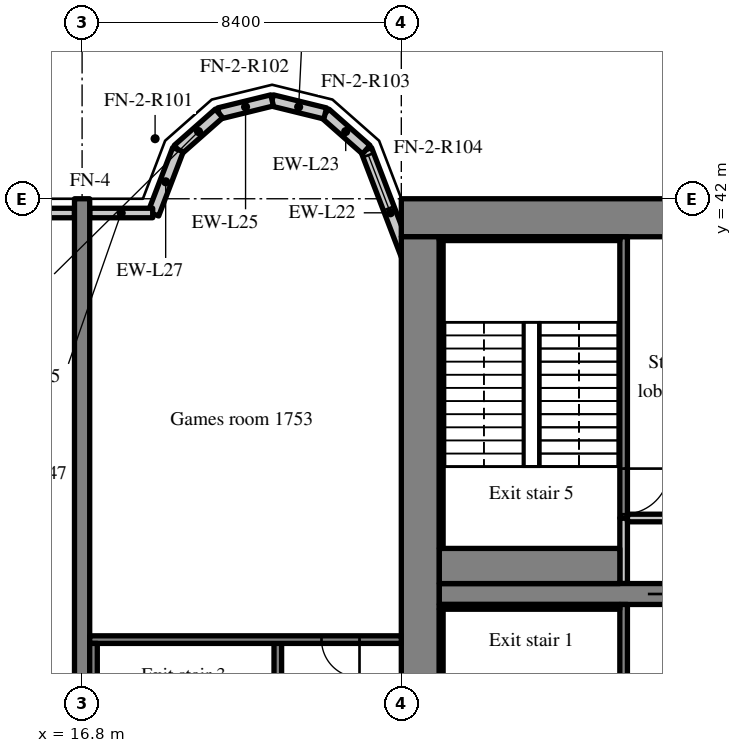
"""IFC4 building model, lengths in metres.
Left out: names, types, materials, properties, quantities, classifications, styles, units other than length and angle.
Written with IfcOpenShell. Run it as: python <this file> out.ifc"""

import sys

from ifc_helpers import new_model, si_unit, direction, frame, frame_2d, origin, place, context, subcontext, project, spatial, rectangle, extrude, source, transform, mapped, element, fill, save


model = new_model("IFC4")
c1 = context("Model", 3, precision=1e-05, world=origin(), true_north=direction((0.0, 1.0)))
c2 = subcontext(c1, "Body", "Model", "MODEL_VIEW")
j1 = project(units=[si_unit("LENGTHUNIT", "METRE"), si_unit("PLANEANGLEUNIT", "RADIAN")], contexts=[c1])
p1 = place(None, origin())
s1 = spatial("IfcSite", under=j1, at=p1, CompositionType="ELEMENT")
p2 = place(p1, origin())
s2 = spatial("IfcBuilding", under=s1, at=p2, CompositionType="ELEMENT")
p3 = place(p2, frame((0.0, 0.0, 73.4)))
s3 = spatial("IfcBuildingStorey", under=s2, at=p3, CompositionType="ELEMENT", Elevation=73.4)
m1 = source(origin(), c2, "Body", "SweptSolid", [
    extrude(rectangle(XDim=50.4, YDim=1.0, at=frame_2d((25.2, 0.0))), origin(), (0.0, 0.0, 1.0), 3.52),
])
p4 = place(p3, frame((25.2, 41.5, 0.0), z_axis=(0.0, 0.0, 1.0), x_axis=(1.0, 0.0, 0.0)))
e1 = element("IfcWall", 1, at=p4, inside=s3, PredefinedType="SHEAR", context=c2, shape_type="MappedRepresentation", body=[
    mapped(m1, transform((0.0, 0.0, 0.0), scale=1.0)),
])
m2 = source(origin(), c2, "Body", "SweptSolid", [
    extrude(rectangle(XDim=18.0, YDim=1.0, at=frame_2d((9.0, 0.0))), origin(), (0.0, 0.0, 1.0), 3.52),
])
p5 = place(p3, frame((25.7, 23.0, 0.0), z_axis=(0.0, 0.0, 1.0), x_axis=(0.0, 1.0, 0.0)))
e2 = element("IfcWall", 2, at=p5, inside=s3, PredefinedType="SHEAR", context=c2, shape_type="MappedRepresentation", body=[
    mapped(m2, transform((0.0, 0.0, 0.0), scale=1.0)),
])
m3 = source(origin(), c2, "Body", "SweptSolid", [
    extrude(rectangle(XDim=7.125, YDim=0.55, at=frame_2d((3.562, 0.0))), origin(), (0.0, 0.0, 1.0), 3.52),
])
p6 = place(p3, frame((26.2, 31.6, 0.0), z_axis=(0.0, 0.0, 1.0), x_axis=(1.0, 0.0, 0.0)))
e3 = element("IfcWall", 3, at=p6, inside=s3, PredefinedType="SHEAR", context=c2, shape_type="MappedRepresentation", body=[
    mapped(m3, transform((0.0, 0.0, 0.0), scale=1.0)),
])
m4 = source(origin(), c2, "Body", "SweptSolid", [
    extrude(rectangle(XDim=1.1, YDim=2.1, at=frame_2d((0.55, 1.05))), frame((0.0, 0.285, 0.0), z_axis=(0.0, -1.0, 0.0), x_axis=(1.0, 0.0, 0.0)), (0.0, 0.0, 1.0), 0.57),
])
p7 = place(p6, frame((5.488, 0.0, 0.0)))
e4 = element("IfcOpeningElement", 4, at=p7, cuts=e3, PredefinedType="OPENING", context=c2, shape_type="MappedRepresentation", body=[
    mapped(m4, transform((0.0, 0.0, 0.0), scale=1.0)),
])
m5 = source(origin(), c2, "Body", "SweptSolid", [
    extrude(rectangle(XDim=20.0, YDim=0.4, at=frame_2d((10.0, 0.0))), origin(), (0.0, 0.0, 1.0), 3.52),
])
p8 = place(p3, frame((16.8, 22.0, 0.0), z_axis=(0.0, 0.0, 1.0), x_axis=(0.0, 1.0, 0.0)))
e5 = element("IfcWall", 5, at=p8, inside=s3, PredefinedType="SHEAR", context=c2, shape_type="MappedRepresentation", body=[
    mapped(m5, transform((0.0, 0.0, 0.0), scale=1.0)),
])
m6 = source(origin(), c2, "Body", "SweptSolid", [
    extrude(rectangle(XDim=3.559, YDim=0.3, at=frame_2d((1.78, 0.0))), origin(), (0.0, 0.0, 1.0), 3.52),
])
p9 = place(p3, frame((25.55, 39.969, 0.0), z_axis=(0.0, 0.0, 1.0), x_axis=(-0.35779745313, 0.933799219604, 0.0)))
e6 = element("IfcWall", 6, at=p9, inside=s3, PredefinedType="SOLIDWALL", context=c2, shape_type="MappedRepresentation", body=[
    mapped(m6, transform((0.0, 0.0, 0.0), scale=1.0)),
])
m7 = source(origin(), c2, "Body", "SweptSolid", [
    extrude(rectangle(XDim=1.5, YDim=2.0, at=frame_2d((0.75, 1.0))), frame((0.0, 0.16, 0.0), z_axis=(0.0, -1.0, 0.0), x_axis=(1.0, 0.0, 0.0)), (0.0, 0.0, 1.0), 0.32),
])
p10 = place(p9, frame((1.903, 0.0, 0.9)))
e7 = element("IfcOpeningElement", 7, at=p10, cuts=e6, PredefinedType="OPENING", context=c2, shape_type="MappedRepresentation", body=[
    mapped(m7, transform((0.0, 0.0, 0.0), scale=1.0)),
])
m8 = source(origin(), c2, "Body", "SweptSolid", [
    extrude(rectangle(XDim=1.44, YDim=0.3, at=frame_2d((0.72, 0.0))), origin(), (0.0, 0.0, 1.0), 3.52),
])
p11 = place(p3, frame((24.277, 43.292, 0.0), z_axis=(0.0, 0.0, 1.0), x_axis=(-0.749649827867, 0.661834673902, 0.0)))
e8 = element("IfcWall", 8, at=p11, inside=s3, PredefinedType="SOLIDWALL", context=c2, shape_type="MappedRepresentation", body=[
    mapped(m8, transform((0.0, 0.0, 0.0), scale=1.0)),
])
m9 = source(origin(), c2, "Body", "SweptSolid", [
    extrude(rectangle(XDim=1.438, YDim=0.3, at=frame_2d((0.719, 0.0))), origin(), (0.0, 0.0, 1.0), 3.52),
])
p12 = place(p3, frame((23.197, 44.245, 0.0), z_axis=(0.0, 0.0, 1.0), x_axis=(-0.971152283879, 0.238460146601, 0.0)))
e9 = element("IfcWall", 9, at=p12, inside=s3, PredefinedType="SOLIDWALL", context=c2, shape_type="MappedRepresentation", body=[
    mapped(m9, transform((0.0, 0.0, 0.0), scale=1.0)),
])
m10 = source(origin(), c2, "Body", "SweptSolid", [
    extrude(rectangle(XDim=1.439, YDim=0.3, at=frame_2d((0.719, 0.0))), origin(), (0.0, 0.0, 1.0), 3.52),
])
p13 = place(p3, frame((21.8, 44.588, 0.0), z_axis=(0.0, 0.0, 1.0), x_axis=(-0.971161932466, -0.238420848351, 0.0)))
e10 = element("IfcWall", 10, at=p13, inside=s3, PredefinedType="SOLIDWALL", context=c2, shape_type="MappedRepresentation", body=[
    mapped(m10, transform((0.0, 0.0, 0.0), scale=1.0)),
])
m11 = source(origin(), c2, "Body", "SweptSolid", [
    extrude(rectangle(XDim=1.44, YDim=0.3, at=frame_2d((0.72, 0.0))), origin(), (0.0, 0.0, 1.0), 3.52),
])
p14 = place(p3, frame((20.403, 44.245, 0.0), z_axis=(0.0, 0.0, 1.0), x_axis=(-0.74957555648, -0.661918790432, 0.0)))
e11 = element("IfcWall", 11, at=p14, inside=s3, PredefinedType="SOLIDWALL", context=c2, shape_type="MappedRepresentation", body=[
    mapped(m11, transform((0.0, 0.0, 0.0), scale=1.0)),
])
m12 = source(origin(), c2, "Body", "SweptSolid", [
    extrude(rectangle(XDim=1.812, YDim=0.3, at=frame_2d((0.906, 0.0))), origin(), (0.0, 0.0, 1.0), 3.52),
])
p15 = place(p3, frame((19.323, 43.292, 0.0), z_axis=(0.0, 0.0, 1.0), x_axis=(-0.357877270961, -0.93376863244, 0.0)))
e12 = element("IfcWall", 12, at=p15, inside=s3, PredefinedType="SOLIDWALL", context=c2, shape_type="MappedRepresentation", body=[
    mapped(m12, transform((0.0, 0.0, 0.0), scale=1.0)),
])
m13 = source(origin(), c2, "Body", "SweptSolid", [
    extrude(rectangle(XDim=3.6, YDim=0.25, at=frame_2d((1.8, 0.0))), origin(), (0.0, 0.0, 1.0), 2.82),
])
p16 = place(p3, frame((16.6, 41.625, 0.0), z_axis=(0.0, 0.0, 1.0), x_axis=(-1.0, 0.0, 0.0)))
e13 = element("IfcWall", 13, at=p16, inside=s3, PredefinedType="SOLIDWALL", context=c2, shape_type="MappedRepresentation", body=[
    mapped(m13, transform((0.0, 0.0, 0.0), scale=1.0)),
])
m14 = source(origin(), c2, "Body", "SweptSolid", [
    extrude(rectangle(XDim=1.5, YDim=1.5, at=frame_2d((0.75, 0.75))), frame((0.0, 0.135, 0.0), z_axis=(0.0, -1.0, 0.0), x_axis=(1.0, 0.0, 0.0)), (0.0, 0.0, 1.0), 0.27),
])
p17 = place(p16, frame((1.05, 0.0, 0.9)))
e14 = element("IfcOpeningElement", 14, at=p17, cuts=e13, PredefinedType="OPENING", context=c2, shape_type="MappedRepresentation", body=[
    mapped(m14, transform((0.0, 0.0, 0.0), scale=1.0)),
])
m15 = source(origin(), c2, "Body", "SweptSolid", [
    extrude(rectangle(XDim=1.658, YDim=0.25, at=frame_2d((0.829, 0.0))), origin(), (0.0, 0.0, 1.0), 2.82),
])
p18 = place(p3, frame((18.658, 41.625, 0.0), z_axis=(0.0, 0.0, 1.0), x_axis=(-1.0, 0.0, 0.0)))
e15 = element("IfcWall", 15, at=p18, inside=s3, PredefinedType="SOLIDWALL", context=c2, shape_type="MappedRepresentation", body=[
    mapped(m15, transform((0.0, 0.0, 0.0), scale=1.0)),
])
m16 = source(origin(), c2, "Body", "SweptSolid", [
    extrude(rectangle(XDim=8.325, YDim=0.2, at=frame_2d((4.163, 0.0))), origin(), (0.0, 0.0, 1.0), 3.52),
])
p19 = place(p3, frame((31.05, 23.0, 0.0), z_axis=(0.0, 0.0, 1.0), x_axis=(0.0, 1.0, 0.0)))
e16 = element("IfcWall", 16, at=p19, inside=s3, PredefinedType="SOLIDWALL", context=c2, shape_type="MappedRepresentation", body=[
    mapped(m16, transform((0.0, 0.0, 0.0), scale=1.0)),
])
m17 = source(origin(), c2, "Body", "SweptSolid", [
    extrude(rectangle(XDim=1.2, YDim=2.1, at=frame_2d((0.6, 1.05))), frame((0.0, 0.11, 0.0), z_axis=(0.0, -1.0, 0.0), x_axis=(1.0, 0.0, 0.0)), (0.0, 0.0, 1.0), 0.22),
])
p20 = place(p19, frame((0.6, 0.0, 0.0)))
e17 = element("IfcOpeningElement", 17, at=p20, cuts=e16, PredefinedType="OPENING", context=c2, shape_type="MappedRepresentation", body=[
    mapped(m17, transform((0.0, 0.0, 0.0), scale=1.0)),
])
m18 = source(origin(), c2, "Body", "SweptSolid", [
    extrude(rectangle(XDim=1.725, YDim=0.2, at=frame_2d((0.863, 0.0))), origin(), (0.0, 0.0, 1.0), 3.52),
])
p21 = place(p3, frame((31.05, 31.875, 0.0), z_axis=(0.0, 0.0, 1.0), x_axis=(0.0, 1.0, 0.0)))
e18 = element("IfcWall", 18, at=p21, inside=s3, PredefinedType="SOLIDWALL", context=c2, shape_type="MappedRepresentation", body=[
    mapped(m18, transform((0.0, 0.0, 0.0), scale=1.0)),
])
m19 = source(origin(), c2, "Body", "SweptSolid", [
    extrude(rectangle(XDim=2.175, YDim=0.2, at=frame_2d((1.087, 0.0))), origin(), (0.0, 0.0, 1.0), 3.52),
])
p22 = place(p3, frame((31.15, 33.6, 0.0), z_axis=(0.0, 0.0, 1.0), x_axis=(1.0, 0.0, 0.0)))
e19 = element("IfcWall", 19, at=p22, inside=s3, PredefinedType="SOLIDWALL", context=c2, shape_type="MappedRepresentation", body=[
    mapped(m19, transform((0.0, 0.0, 0.0), scale=1.0)),
])
m20 = source(origin(), c2, "Body", "SweptSolid", [
    extrude(rectangle(XDim=7.4, YDim=0.2, at=frame_2d((3.7, 0.0))), origin(), (0.0, 0.0, 1.0), 3.52),
])
p23 = place(p3, frame((31.05, 33.6, 0.0), z_axis=(0.0, 0.0, 1.0), x_axis=(0.0, 1.0, 0.0)))
e20 = element("IfcWall", 20, at=p23, inside=s3, PredefinedType="SOLIDWALL", context=c2, shape_type="MappedRepresentation", body=[
    mapped(m20, transform((0.0, 0.0, 0.0), scale=1.0)),
])
p24 = place(p23, frame((0.1, 0.0, 0.0)))
e21 = element("IfcOpeningElement", 21, at=p24, cuts=e20, PredefinedType="OPENING", context=c2, shape_type="MappedRepresentation", body=[
    mapped(m17, transform((0.0, 0.0, 0.0), scale=1.0)),
])
m21 = source(origin(), c2, "Body", "SweptSolid", [
    extrude(rectangle(XDim=8.3, YDim=0.2, at=frame_2d((4.15, 0.0))), origin(), (0.0, 0.0, 1.0), 3.52),
])
p25 = place(p3, frame((21.95, 22.1, 0.0), z_axis=(0.0, 0.0, 1.0), x_axis=(0.0, 1.0, 0.0)))
e22 = element("IfcWall", 22, at=p25, inside=s3, PredefinedType="SOLIDWALL", context=c2, shape_type="MappedRepresentation", body=[
    mapped(m21, transform((0.0, 0.0, 0.0), scale=1.0)),
])
p26 = place(p25, frame((0.6, 0.0, 0.0)))
e23 = element("IfcOpeningElement", 23, at=p26, cuts=e22, PredefinedType="OPENING", context=c2, shape_type="MappedRepresentation", body=[
    mapped(m17, transform((0.0, 0.0, 0.0), scale=1.0)),
])
m22 = source(origin(), c2, "Body", "SweptSolid", [
    extrude(rectangle(XDim=8.2, YDim=0.2, at=frame_2d((4.1, 0.0))), origin(), (0.0, 0.0, 1.0), 3.52),
])
p27 = place(p3, frame((17.0, 30.4, 0.0), z_axis=(0.0, 0.0, 1.0), x_axis=(1.0, 0.0, 0.0)))
e24 = element("IfcWall", 24, at=p27, inside=s3, PredefinedType="SOLIDWALL", context=c2, shape_type="MappedRepresentation", body=[
    mapped(m22, transform((0.0, 0.0, 0.0), scale=1.0)),
])
m23 = source(origin(), c2, "Body", "SweptSolid", [
    extrude(rectangle(XDim=1.0, YDim=2.1, at=frame_2d((0.5, 1.05))), frame((0.0, 0.11, 0.0), z_axis=(0.0, -1.0, 0.0), x_axis=(1.0, 0.0, 0.0)), (0.0, 0.0, 1.0), 0.22),
])
p28 = place(p27, frame((6.1, 0.0, 0.0)))
e25 = element("IfcOpeningElement", 25, at=p28, cuts=e24, PredefinedType="OPENING", context=c2, shape_type="MappedRepresentation", body=[
    mapped(m23, transform((0.0, 0.0, 0.0), scale=1.0)),
])
m24 = source(origin(), c2, "Body", "SweptSolid", [
    extrude(rectangle(XDim=4.75, YDim=0.125, at=frame_2d((2.375, 0.0))), origin(), (0.0, 0.0, 1.0), 3.52),
])
p29 = place(p3, frame((26.2, 31.262, 0.0), z_axis=(0.0, 0.0, 1.0), x_axis=(1.0, 0.0, 0.0)))
e26 = element("IfcWall", 26, at=p29, inside=s3, PredefinedType="SOLIDWALL", context=c2, shape_type="MappedRepresentation", body=[
    mapped(m24, transform((0.0, 0.0, 0.0), scale=1.0)),
])
m25 = source(origin(), c2, "Body", "SweptSolid", [
    extrude(rectangle(XDim=8.1, YDim=0.1, at=frame_2d((4.05, 0.0))), origin(), (0.0, 0.0, 1.0), 3.52),
])
p30 = place(p3, frame((26.25, 23.1, 0.0), z_axis=(0.0, 0.0, 1.0), x_axis=(0.0, 1.0, 0.0)))
e27 = element("IfcWall", 27, at=p30, inside=s3, PredefinedType="SOLIDWALL", context=c2, shape_type="MappedRepresentation", body=[
    mapped(m25, transform((0.0, 0.0, 0.0), scale=1.0)),
])
m26 = source(origin(), c2, "Body", "SweptSolid", [
    extrude(rectangle(XDim=8.1, YDim=0.2, at=frame_2d((4.05, 0.0))), origin(), (0.0, 0.0, 1.0), 3.52),
])
p31 = place(p3, frame((17.1, 22.2, 0.0), z_axis=(0.0, 0.0, 1.0), x_axis=(0.0, 1.0, 0.0)))
e28 = element("IfcWall", 28, at=p31, inside=s3, PredefinedType="SOLIDWALL", context=c2, shape_type="MappedRepresentation", body=[
    mapped(m26, transform((0.0, 0.0, 0.0), scale=1.0)),
])
m27 = source(origin(), c2, "Body", "SweptSolid", [
    extrude(rectangle(XDim=4.75, YDim=0.1, at=frame_2d((2.375, 0.0))), origin(), (0.0, 0.0, 1.0), 3.52),
])
p32 = place(p3, frame((26.2, 40.95, 0.0), z_axis=(0.0, 0.0, 1.0), x_axis=(1.0, 0.0, 0.0)))
e29 = element("IfcWall", 29, at=p32, inside=s3, PredefinedType="SOLIDWALL", context=c2, shape_type="MappedRepresentation", body=[
    mapped(m27, transform((0.0, 0.0, 0.0), scale=1.0)),
])
m28 = source(origin(), c2, "Body", "SweptSolid", [
    extrude(rectangle(XDim=4.75, YDim=0.925, at=frame_2d((2.375, 0.0))), origin(), (0.0, 0.0, 1.0), 3.52),
])
p33 = place(p3, frame((26.2, 32.337, 0.0), z_axis=(0.0, 0.0, 1.0), x_axis=(1.0, 0.0, 0.0)))
e30 = element("IfcWall", 30, at=p33, inside=s3, PredefinedType="SOLIDWALL", context=c2, shape_type="MappedRepresentation", body=[
    mapped(m28, transform((0.0, 0.0, 0.0), scale=1.0)),
])
p34 = place(p3, frame((26.25, 32.8, 0.0), z_axis=(0.0, 0.0, 1.0), x_axis=(0.0, 1.0, 0.0)))
e31 = element("IfcWall", 31, at=p34, inside=s3, PredefinedType="SOLIDWALL", context=c2, shape_type="MappedRepresentation", body=[
    mapped(m25, transform((0.0, 0.0, 0.0), scale=1.0)),
])
m29 = source(origin(), c2, "Body", "SweptSolid", [
    extrude(rectangle(XDim=1.5, YDim=2.0, at=frame_2d((0.75, 1.0))), frame((0.0, 0.03, 0.0), z_axis=(0.0, -1.0, 0.0), x_axis=(1.0, 0.0, 0.0)), (0.0, 0.0, 1.0), 0.06),
])
p35 = place(p10, origin())
e32 = element("IfcWindow", 32, at=p35, inside=s3, PartitioningType="SINGLE_PANEL", PredefinedType="WINDOW", context=c2, shape_type="MappedRepresentation", body=[
    mapped(m29, transform((0.0, 0.0, 0.0), scale=1.0)),
])
fill(e7, e32)
m30 = source(origin(), c2, "Body", "SweptSolid", [
    extrude(rectangle(XDim=1.1, YDim=2.1, at=frame_2d((0.55, 1.05))), frame((0.0, 0.025, 0.0), z_axis=(0.0, -1.0, 0.0), x_axis=(1.0, 0.0, 0.0)), (0.0, 0.0, 1.0), 0.05),
])
p36 = place(p7, origin())
e33 = element("IfcDoor", 33, at=p36, inside=s3, OperationType="SLIDING_TO_RIGHT", PredefinedType="DOOR", context=c2, shape_type="MappedRepresentation", body=[
    mapped(m30, transform((0.0, 0.0, 0.0), scale=1.0)),
])
fill(e4, e33)
m31 = source(origin(), c2, "Body", "SweptSolid", [
    extrude(rectangle(XDim=1.2, YDim=2.1, at=frame_2d((0.6, 1.05))), frame((0.0, 0.025, 0.0), z_axis=(0.0, -1.0, 0.0), x_axis=(1.0, 0.0, 0.0)), (0.0, 0.0, 1.0), 0.05),
])
p37 = place(p24, origin())
e34 = element("IfcDoor", 34, at=p37, inside=s3, OperationType="SINGLE_SWING_RIGHT", PredefinedType="DOOR", context=c2, shape_type="MappedRepresentation", body=[
    mapped(m31, transform((0.0, 0.0, 0.0), scale=1.0)),
])
fill(e21, e34)
m32 = source(origin(), c2, "Body", "SweptSolid", [
    extrude(rectangle(XDim=1.0, YDim=2.1, at=frame_2d((0.5, 1.05))), frame((0.0, 0.025, 0.0), z_axis=(0.0, -1.0, 0.0), x_axis=(1.0, 0.0, 0.0)), (0.0, 0.0, 1.0), 0.05),
])
p38 = place(p28, origin())
e35 = element("IfcDoor", 35, at=p38, inside=s3, OperationType="SINGLE_SWING_RIGHT", PredefinedType="DOOR", context=c2, shape_type="MappedRepresentation", body=[
    mapped(m32, transform((0.0, 0.0, 0.0), scale=1.0)),
])
fill(e25, e35)
save(model, sys.argv[1])
